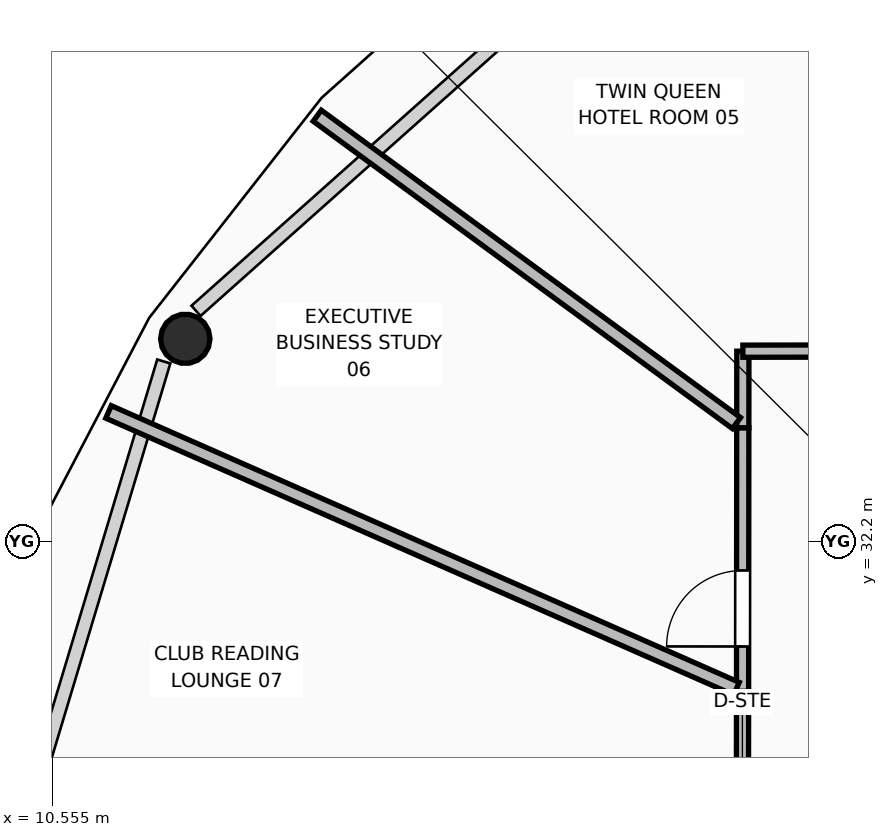
"""IFC4 building model, lengths in metres.
Left out: names, types, materials, properties, quantities, classifications, styles, units other than length and angle.
Written with IfcOpenShell. Run it as: python <this file> out.ifc"""

import sys

from ifc_helpers import new_model, si_unit, direction, frame, frame_2d, origin, origin_2d, place, context, subcontext, project, spatial, rectangle, hollow_circle, extrude, element, fill, save


model = new_model("IFC4")
c1 = context("Model", 3, precision=1e-05, world=origin(), true_north=direction((0.0, 1.0)))
c2 = subcontext(c1, "Body", "Model", "MODEL_VIEW")
j1 = project(units=[si_unit("LENGTHUNIT", "METRE"), si_unit("PLANEANGLEUNIT", "RADIAN")], contexts=[c1])
p1 = place(None, origin())
s1 = spatial("IfcSite", under=j1, at=p1, CompositionType="ELEMENT")
p2 = place(p1, origin())
s2 = spatial("IfcBuilding", under=s1, at=p2, CompositionType="ELEMENT")
p3 = place(p2, frame((0.0, 0.0, 212.4)))
s3 = spatial("IfcBuildingStorey", under=s2, at=p3, CompositionType="ELEMENT", Elevation=212.4)
p4 = place(p3, frame((12.308, 34.863, 0.0), z_axis=(0.017913341834, -0.009230157052, 0.999796937575), x_axis=(0.458037839434, 0.888932695791, 0.0)))
e1 = element("IfcColumn", 1, at=p4, inside=s3, PredefinedType="COLUMN", context=c2, shape_type="SweptSolid", body=[
    extrude(hollow_circle(Radius=0.325, WallThickness=0.03, at=origin_2d()), origin(), (0.0, 0.0, 1.0), 3.571),
])
p5 = place(p3, frame((19.636, 26.894, 0.0), z_axis=(0.0, 0.0, 1.0), x_axis=(0.001172332137, 0.999999312818, 0.0)))
e2 = element("IfcWall", 2, at=p5, inside=s3, PredefinedType="PARTITIONING", context=c2, shape_type="SweptSolid", body=[
    extrude(rectangle(XDim=3.332, YDim=0.16, at=frame_2d((1.666, 0.0))), origin(), (0.0, 0.0, 1.0), 3.55),
])
p6 = place(p5, frame((0.996, 0.0, 0.0)))
e3 = element("IfcOpeningElement", 3, at=p6, cuts=e2, PredefinedType="OPENING", context=c2, shape_type="SweptSolid", body=[
    extrude(rectangle(XDim=1.2, YDim=2.1, at=frame_2d((0.6, 1.05))), frame((0.0, 0.09, 0.0), z_axis=(0.0, -1.0, 0.0), x_axis=(1.0, 0.0, 0.0)), (0.0, 0.0, 1.0), 0.18),
])
p7 = place(p3, frame((19.64, 30.226, 0.0), z_axis=(0.0, 0.0, 1.0), x_axis=(0.000915428107, 0.999999580996, 0.0)))
e4 = element("IfcWall", 4, at=p7, inside=s3, PredefinedType="PARTITIONING", context=c2, shape_type="SweptSolid", body=[
    extrude(rectangle(XDim=3.467, YDim=0.16, at=frame_2d((1.733, 0.0))), origin(), (0.0, 0.0, 1.0), 3.081),
])
p8 = place(p7, frame((0.589, 0.0, 0.0)))
e5 = element("IfcOpeningElement", 5, at=p8, cuts=e4, PredefinedType="OPENING", context=c2, shape_type="SweptSolid", body=[
    extrude(rectangle(XDim=1.0, YDim=2.1, at=frame_2d((0.5, 1.05))), frame((0.0, 0.09, 0.0), z_axis=(0.0, -1.0, 0.0), x_axis=(1.0, 0.0, 0.0)), (0.0, 0.0, 1.0), 0.18),
])
p9 = place(p3, frame((19.643, 33.693, 0.0), z_axis=(0.0, 0.0, 1.0), x_axis=(0.000969931649, 0.999999529616, 0.0)))
e6 = element("IfcWall", 6, at=p9, inside=s3, PredefinedType="PARTITIONING", context=c2, shape_type="SweptSolid", body=[
    extrude(rectangle(XDim=1.007, YDim=0.16, at=frame_2d((0.503, 0.0))), origin(), (0.0, 0.0, 1.0), 3.55),
])
p10 = place(p3, frame((19.644, 34.7, 0.0), z_axis=(0.0, 0.0, 1.0), x_axis=(0.999999060672, 0.00137064024, 0.0)))
e7 = element("IfcWall", 7, at=p10, inside=s3, PredefinedType="PARTITIONING", context=c2, shape_type="SweptSolid", body=[
    extrude(rectangle(XDim=7.303, YDim=0.16, at=frame_2d((3.651, 0.0))), origin(), (0.0, 0.0, 1.0), 3.081),
])
p11 = place(p10, frame((4.498, 0.0, 0.0)))
e8 = element("IfcOpeningElement", 8, at=p11, cuts=e7, PredefinedType="OPENING", context=c2, shape_type="SweptSolid", body=[
    extrude(rectangle(XDim=1.0, YDim=2.1, at=frame_2d((0.5, 1.05))), frame((0.0, 0.09, 0.0), z_axis=(0.0, -1.0, 0.0), x_axis=(1.0, 0.0, 0.0)), (0.0, 0.0, 1.0), 0.18),
])
p12 = place(p3, frame((19.56, 33.754, 0.0), z_axis=(0.0, 0.0, 1.0), x_axis=(-0.80647194287, 0.591272361407, 0.0)))
e9 = element("IfcWall", 9, at=p12, inside=s3, PredefinedType="PARTITIONING", context=c2, shape_type="SweptSolid", body=[
    extrude(rectangle(XDim=6.84, YDim=0.18, at=frame_2d((3.42, 0.0))), origin(), (0.0, 0.0, 1.0), 2.925),
])
p13 = place(p3, frame((19.56, 30.261, 0.0), z_axis=(0.0, 0.0, 1.0), x_axis=(-0.915125928118, 0.403168123351, 0.0)))
e10 = element("IfcWall", 10, at=p13, inside=s3, PredefinedType="PARTITIONING", context=c2, shape_type="SweptSolid", body=[
    extrude(rectangle(XDim=9.028, YDim=0.18, at=frame_2d((4.514, 0.0))), origin(), (0.0, 0.0, 1.0), 2.925),
])
p14 = place(p8, origin())
e11 = element("IfcDoor", 11, at=p14, inside=s3, OperationType="SINGLE_SWING_LEFT", PredefinedType="DOOR", context=c2, shape_type="SweptSolid", body=[
    extrude(rectangle(XDim=1.0, YDim=2.1, at=frame_2d((0.5, 1.05))), frame((0.0, 0.025, 0.0), z_axis=(0.0, -1.0, 0.0), x_axis=(1.0, 0.0, 0.0)), (0.0, 0.0, 1.0), 0.05),
])
fill(e5, e11)
save(model, sys.argv[1])
